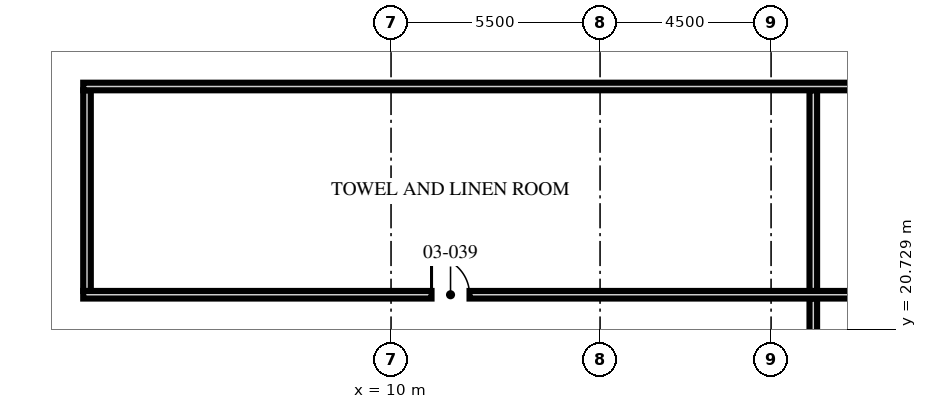
"""IFC4 building model, lengths in metres.
Left out: names, types, materials, properties, quantities, classifications, styles, units other than length and angle.
Written with IfcOpenShell. Run it as: python <this file> out.ifc"""

import sys

from ifc_helpers import new_model, si_unit, direction, frame, frame_2d, origin, place, context, subcontext, project, spatial, rectangle, extrude, element, fill, save


model = new_model("IFC4")
c1 = context("Model", 3, precision=1e-05, world=origin(), true_north=direction((0.0, 1.0)))
c2 = subcontext(c1, "Body", "Model", "MODEL_VIEW")
j1 = project(units=[si_unit("LENGTHUNIT", "METRE"), si_unit("PLANEANGLEUNIT", "RADIAN")], contexts=[c1])
p1 = place(None, origin())
s1 = spatial("IfcSite", under=j1, at=p1, CompositionType="ELEMENT")
p2 = place(p1, origin())
s2 = spatial("IfcBuilding", under=s1, at=p2, CompositionType="ELEMENT")
p3 = place(p2, frame((0.0, 0.0, 16.0)))
s3 = spatial("IfcBuildingStorey", under=s2, at=p3, CompositionType="ELEMENT", Elevation=16.0)
p4 = place(p3, frame((21.111, -20.491, 0.0), z_axis=(0.0, 0.0, 1.0), x_axis=(0.0, 1.0, 0.0)))
e1 = element("IfcWall", 1, at=p4, inside=s3, PredefinedType="SOLIDWALL", context=c2, shape_type="SweptSolid", body=[
    extrude(rectangle(XDim=42.022, YDim=0.2, at=frame_2d((21.011, 0.0))), origin(), (0.0, 0.0, 1.0), 3.55),
])
p5 = place(p4, frame((5.962, 0.0, 0.0)))
e2 = element("IfcOpeningElement", 2, at=p5, cuts=e1, PredefinedType="OPENING", context=c2, shape_type="SweptSolid", body=[
    extrude(rectangle(XDim=1.8, YDim=2.4, at=frame_2d((0.9, 1.2))), frame((0.0, 0.11, 0.0), z_axis=(0.0, -1.0, 0.0), x_axis=(1.0, 0.0, 0.0)), (0.0, 0.0, 1.0), 0.22),
])
p6 = place(p4, frame((18.629, 0.0, 0.0)))
e3 = element("IfcOpeningElement", 3, at=p6, cuts=e1, PredefinedType="OPENING", context=c2, shape_type="SweptSolid", body=[
    extrude(rectangle(XDim=1.8, YDim=2.4, at=frame_2d((0.9, 1.2))), frame((0.0, 0.11, 0.0), z_axis=(0.0, -1.0, 0.0), x_axis=(1.0, 0.0, 0.0)), (0.0, 0.0, 1.0), 0.22),
])
p7 = place(p4, frame((27.363, 0.0, 0.0)))
e4 = element("IfcOpeningElement", 4, at=p7, cuts=e1, PredefinedType="OPENING", context=c2, shape_type="SweptSolid", body=[
    extrude(rectangle(XDim=1.0, YDim=2.1, at=frame_2d((0.5, 1.05))), frame((0.0, 0.11, 0.0), z_axis=(0.0, -1.0, 0.0), x_axis=(1.0, 0.0, 0.0)), (0.0, 0.0, 1.0), 0.22),
])
p8 = place(p4, frame((37.4, 0.0, 0.0)))
e5 = element("IfcOpeningElement", 5, at=p8, cuts=e1, PredefinedType="OPENING", context=c2, shape_type="SweptSolid", body=[
    extrude(rectangle(XDim=1.0, YDim=2.1, at=frame_2d((0.5, 1.05))), frame((0.0, 0.11, 0.0), z_axis=(0.0, -1.0, 0.0), x_axis=(1.0, 0.0, 0.0)), (0.0, 0.0, 1.0), 0.22),
])
p9 = place(p4, frame((31.584, 0.0, 0.0)))
e6 = element("IfcOpeningElement", 6, at=p9, cuts=e1, PredefinedType="OPENING", context=c2, shape_type="SweptSolid", body=[
    extrude(rectangle(XDim=1.0, YDim=2.1, at=frame_2d((0.5, 1.05))), frame((0.0, 0.11, 0.0), z_axis=(0.0, -1.0, 0.0), x_axis=(1.0, 0.0, 0.0)), (0.0, 0.0, 1.0), 0.22),
])
p10 = place(p3, frame((1.9, 21.631, 0.0), z_axis=(0.0, 0.0, 1.0), x_axis=(1.0, 0.0, 0.0)))
e7 = element("IfcWall", 7, at=p10, inside=s3, PredefinedType="SOLIDWALL", context=c2, shape_type="SweptSolid", body=[
    extrude(rectangle(XDim=26.95, YDim=0.2, at=frame_2d((13.475, 0.0))), origin(), (0.0, 0.0, 1.0), 3.55),
])
p11 = place(p10, frame((9.166, 0.0, 0.0)))
e8 = element("IfcOpeningElement", 8, at=p11, cuts=e7, PredefinedType="OPENING", context=c2, shape_type="SweptSolid", body=[
    extrude(rectangle(XDim=1.0, YDim=2.1, at=frame_2d((0.5, 1.05))), frame((0.0, 0.11, 0.0), z_axis=(0.0, -1.0, 0.0), x_axis=(1.0, 0.0, 0.0)), (0.0, 0.0, 1.0), 0.22),
])
for number, where, z_axis, x_axis in (
    (9, (2.0, 21.731, 0.0), (0.0, 0.0, 1.0), (0.0, 1.0, 0.0)),
    (10, (21.111, 21.731, 0.0), (0.0, 0.0, 1.0), (0.0, 1.0, 0.0)),
):
    element("IfcWall", number, at=place(p3, frame(where, z_axis=z_axis, x_axis=x_axis)), inside=s3, PredefinedType="SOLIDWALL", context=c2, shape_type="SweptSolid", body=[
        extrude(rectangle(XDim=5.28, YDim=0.2, at=frame_2d((2.64, 0.0))), origin(), (0.0, 0.0, 1.0), 4.75),
    ])
p12 = place(p3, frame((1.9, 27.111, 0.0), z_axis=(0.0, 0.0, 1.0), x_axis=(1.0, 0.0, 0.0)))
e11 = element("IfcWall", 11, at=p12, inside=s3, PredefinedType="SOLIDWALL", context=c2, shape_type="SweptSolid", body=[
    extrude(rectangle(XDim=36.175, YDim=0.2, at=frame_2d((18.087, 0.0))), origin(), (0.0, 0.0, 1.0), 3.55),
])
p13 = place(p12, frame((29.695, 0.0, 0.0)))
e12 = element("IfcOpeningElement", 12, at=p13, cuts=e11, PredefinedType="OPENING", context=c2, shape_type="SweptSolid", body=[
    extrude(rectangle(XDim=1.0, YDim=2.1, at=frame_2d((0.5, 1.05))), frame((0.0, 0.11, 0.0), z_axis=(0.0, -1.0, 0.0), x_axis=(1.0, 0.0, 0.0)), (0.0, 0.0, 1.0), 0.22),
])
p14 = place(p11, origin())
e13 = element("IfcDoor", 13, at=p14, inside=s3, OperationType="SINGLE_SWING_LEFT", PredefinedType="DOOR", context=c2, shape_type="SweptSolid", body=[
    extrude(rectangle(XDim=1.0, YDim=2.1, at=frame_2d((0.5, 1.05))), frame((0.0, 0.025, 0.0), z_axis=(0.0, -1.0, 0.0), x_axis=(1.0, 0.0, 0.0)), (0.0, 0.0, 1.0), 0.05),
])
fill(e8, e13)
save(model, sys.argv[1])
